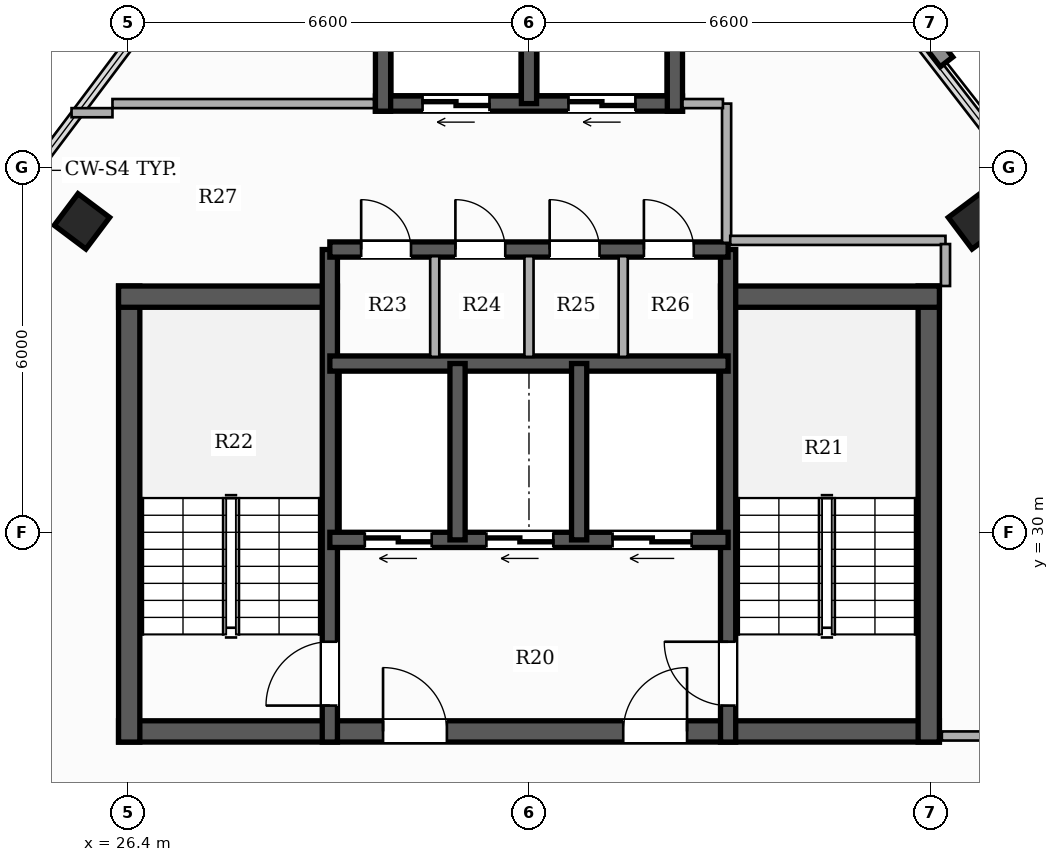
"""IFC4 building model, lengths in metres.
Left out: names, types, materials, properties, quantities, classifications, styles, units other than length and angle.
Written with IfcOpenShell. Run it as: python <this file> out.ifc"""

import sys

from ifc_helpers import new_model, si_unit, direction, frame, frame_2d, origin, origin_2d, place, context, subcontext, project, spatial, rectangle, hollow_rectangle, extrude, element, fill, save


model = new_model("IFC4")
c1 = context("Model", 3, precision=1e-05, world=origin(), true_north=direction((0.0, 1.0)))
c2 = subcontext(c1, "Body", "Model", "MODEL_VIEW")
j1 = project(units=[si_unit("LENGTHUNIT", "METRE"), si_unit("PLANEANGLEUNIT", "RADIAN")], contexts=[c1])
p1 = place(None, origin())
s1 = spatial("IfcSite", under=j1, at=p1, CompositionType="ELEMENT")
p2 = place(p1, origin())
s2 = spatial("IfcBuilding", under=s1, at=p2, CompositionType="ELEMENT")
p3 = place(p2, frame((0.0, 0.0, 270.05)))
s3 = spatial("IfcBuildingStorey", under=s2, at=p3, CompositionType="ELEMENT", Elevation=270.05)
p4 = place(p3, frame((26.25, 26.725, 0.0), z_axis=(0.0, 0.0, 1.0), x_axis=(1.0, 0.0, 0.0)))
e1 = element("IfcWall", 1, at=p4, inside=s3, PredefinedType="SHEAR", context=c2, shape_type="SweptSolid", body=[
    extrude(rectangle(XDim=13.5, YDim=0.35, at=frame_2d((6.75, 0.0))), origin(), (0.0, 0.0, 1.0), 3.3),
])
p5 = place(p4, frame((4.35, 0.0, 0.0)))
e2 = element("IfcOpeningElement", 2, at=p5, cuts=e1, PredefinedType="OPENING", context=c2, shape_type="SweptSolid", body=[
    extrude(rectangle(XDim=1.05, YDim=2.15, at=frame_2d((0.525, 1.075))), frame((0.0, 0.185, 0.0), z_axis=(0.0, -1.0, 0.0), x_axis=(1.0, 0.0, 0.0)), (0.0, 0.0, 1.0), 0.37),
])
p6 = place(p4, frame((8.3, 0.0, 0.0)))
e3 = element("IfcOpeningElement", 3, at=p6, cuts=e1, PredefinedType="OPENING", context=c2, shape_type="SweptSolid", body=[
    extrude(rectangle(XDim=1.05, YDim=2.15, at=frame_2d((0.525, 1.075))), frame((0.0, 0.185, 0.0), z_axis=(0.0, -1.0, 0.0), x_axis=(1.0, 0.0, 0.0)), (0.0, 0.0, 1.0), 0.37),
])
p7 = place(p3, frame((26.425, 26.55, 0.0), z_axis=(0.0, 0.0, 1.0), x_axis=(0.0, 1.0, 0.0)))
e4 = element("IfcWall", 4, at=p7, inside=s3, PredefinedType="SHEAR", context=c2, shape_type="SweptSolid", body=[
    extrude(rectangle(XDim=7.5, YDim=0.35, at=frame_2d((3.75, 0.0))), origin(), (0.0, 0.0, 1.0), 3.3),
])
p8 = place(p3, frame((26.25, 33.875, 0.0), z_axis=(0.0, 0.0, 1.0), x_axis=(1.0, 0.0, 0.0)))
e5 = element("IfcWall", 5, at=p8, inside=s3, PredefinedType="SHEAR", context=c2, shape_type="SweptSolid", body=[
    extrude(rectangle(XDim=3.6, YDim=0.35, at=frame_2d((1.8, 0.0))), origin(), (0.0, 0.0, 1.0), 3.3),
])
p9 = place(p3, frame((39.575, 26.55, 0.0), z_axis=(0.0, 0.0, 1.0), x_axis=(0.0, 1.0, 0.0)))
e6 = element("IfcWall", 6, at=p9, inside=s3, PredefinedType="SHEAR", context=c2, shape_type="SweptSolid", body=[
    extrude(rectangle(XDim=7.5, YDim=0.35, at=frame_2d((3.75, 0.0))), origin(), (0.0, 0.0, 1.0), 3.3),
])
p10 = place(p3, frame((36.15, 33.875, 0.0), z_axis=(0.0, 0.0, 1.0), x_axis=(1.0, 0.0, 0.0)))
e7 = element("IfcWall", 7, at=p10, inside=s3, PredefinedType="SHEAR", context=c2, shape_type="SweptSolid", body=[
    extrude(rectangle(XDim=3.6, YDim=0.35, at=frame_2d((1.8, 0.0))), origin(), (0.0, 0.0, 1.0), 3.3),
])
p11 = place(p3, frame((29.725, 26.55, 0.0), z_axis=(0.0, 0.0, 1.0), x_axis=(0.0, 1.0, 0.0)))
e8 = element("IfcWall", 8, at=p11, inside=s3, PredefinedType="SHEAR", context=c2, shape_type="SweptSolid", body=[
    extrude(rectangle(XDim=8.1, YDim=0.25, at=frame_2d((4.05, 0.0))), origin(), (0.0, 0.0, 1.0), 3.3),
])
p12 = place(p11, frame((0.6, 0.0, 0.0)))
e9 = element("IfcOpeningElement", 9, at=p12, cuts=e8, PredefinedType="OPENING", context=c2, shape_type="SweptSolid", body=[
    extrude(rectangle(XDim=1.05, YDim=2.15, at=frame_2d((0.525, 1.075))), frame((0.0, 0.135, 0.0), z_axis=(0.0, -1.0, 0.0), x_axis=(1.0, 0.0, 0.0)), (0.0, 0.0, 1.0), 0.27),
])
p13 = place(p3, frame((36.275, 26.55, 0.0), z_axis=(0.0, 0.0, 1.0), x_axis=(0.0, 1.0, 0.0)))
e10 = element("IfcWall", 10, at=p13, inside=s3, PredefinedType="SHEAR", context=c2, shape_type="SweptSolid", body=[
    extrude(rectangle(XDim=8.1, YDim=0.25, at=frame_2d((4.05, 0.0))), origin(), (0.0, 0.0, 1.0), 3.3),
])
p14 = place(p13, frame((0.6, 0.0, 0.0)))
e11 = element("IfcOpeningElement", 11, at=p14, cuts=e10, PredefinedType="OPENING", context=c2, shape_type="SweptSolid", body=[
    extrude(rectangle(XDim=1.05, YDim=2.15, at=frame_2d((0.525, 1.075))), frame((0.0, 0.135, 0.0), z_axis=(0.0, -1.0, 0.0), x_axis=(1.0, 0.0, 0.0)), (0.0, 0.0, 1.0), 0.27),
])
p15 = place(p3, frame((36.275, 29.875, 0.0), z_axis=(0.0, 0.0, 1.0), x_axis=(-1.0, 0.0, 0.0)))
e12 = element("IfcWall", 12, at=p15, inside=s3, PredefinedType="SHEAR", context=c2, shape_type="SweptSolid", body=[
    extrude(rectangle(XDim=6.55, YDim=0.25, at=frame_2d((3.275, 0.0))), origin(), (0.0, 0.0, 1.0), 3.3),
])
p16 = place(p15, frame((4.875, 0.0, 0.0)))
e13 = element("IfcOpeningElement", 13, at=p16, cuts=e12, PredefinedType="OPENING", context=c2, shape_type="SweptSolid", body=[
    extrude(rectangle(XDim=1.1, YDim=2.2, at=frame_2d((0.55, 1.1))), frame((0.0, 0.135, 0.0), z_axis=(0.0, -1.0, 0.0), x_axis=(1.0, 0.0, 0.0)), (0.0, 0.0, 1.0), 0.27),
])
p17 = place(p15, frame((2.875, 0.0, 0.0)))
e14 = element("IfcOpeningElement", 14, at=p17, cuts=e12, PredefinedType="OPENING", context=c2, shape_type="SweptSolid", body=[
    extrude(rectangle(XDim=1.1, YDim=2.2, at=frame_2d((0.55, 1.1))), frame((0.0, 0.135, 0.0), z_axis=(0.0, -1.0, 0.0), x_axis=(1.0, 0.0, 0.0)), (0.0, 0.0, 1.0), 0.27),
])
p18 = place(p15, frame((0.6, 0.0, 0.0)))
e15 = element("IfcOpeningElement", 15, at=p18, cuts=e12, PredefinedType="OPENING", context=c2, shape_type="SweptSolid", body=[
    extrude(rectangle(XDim=1.3, YDim=2.2, at=frame_2d((0.65, 1.1))), frame((0.0, 0.135, 0.0), z_axis=(0.0, -1.0, 0.0), x_axis=(1.0, 0.0, 0.0)), (0.0, 0.0, 1.0), 0.27),
])
p19 = place(p3, frame((29.725, 32.775, 0.0), z_axis=(0.0, 0.0, 1.0), x_axis=(1.0, 0.0, 0.0)))
e16 = element("IfcWall", 16, at=p19, inside=s3, PredefinedType="SHEAR", context=c2, shape_type="SweptSolid", body=[
    extrude(rectangle(XDim=6.55, YDim=0.25, at=frame_2d((3.275, 0.0))), origin(), (0.0, 0.0, 1.0), 3.3),
])
for number, where, z_axis, x_axis in (
    (17, (31.825, 29.875, 0.0), (0.0, 0.0, 1.0), (0.0, 1.0, 0.0)),
    (18, (33.825, 29.875, 0.0), (0.0, 0.0, 1.0), (0.0, 1.0, 0.0)),
):
    element("IfcWall", number, at=place(p3, frame(where, z_axis=z_axis, x_axis=x_axis)), inside=s3, PredefinedType="SHEAR", context=c2, shape_type="SweptSolid", body=[
        extrude(rectangle(XDim=2.9, YDim=0.25, at=frame_2d((1.45, 0.0))), origin(), (0.0, 0.0, 1.0), 3.3),
    ])
p20 = place(p3, frame((29.725, 34.65, 0.0), z_axis=(0.0, 0.0, 1.0), x_axis=(1.0, 0.0, 0.0)))
e19 = element("IfcWall", 19, at=p20, inside=s3, PredefinedType="SHEAR", context=c2, shape_type="SweptSolid", body=[
    extrude(rectangle(XDim=6.55, YDim=0.25, at=frame_2d((3.275, 0.0))), origin(), (0.0, 0.0, 1.0), 3.3),
])
p21 = place(p20, frame((0.515, 0.0, 0.0)))
e20 = element("IfcOpeningElement", 20, at=p21, cuts=e19, PredefinedType="OPENING", context=c2, shape_type="SweptSolid", body=[
    extrude(rectangle(XDim=0.82, YDim=2.1, at=frame_2d((0.41, 1.05))), frame((0.0, 0.135, 0.0), z_axis=(0.0, -1.0, 0.0), x_axis=(1.0, 0.0, 0.0)), (0.0, 0.0, 1.0), 0.27),
])
p22 = place(p20, frame((2.065, 0.0, 0.0)))
e21 = element("IfcOpeningElement", 21, at=p22, cuts=e19, PredefinedType="OPENING", context=c2, shape_type="SweptSolid", body=[
    extrude(rectangle(XDim=0.82, YDim=2.1, at=frame_2d((0.41, 1.05))), frame((0.0, 0.135, 0.0), z_axis=(0.0, -1.0, 0.0), x_axis=(1.0, 0.0, 0.0)), (0.0, 0.0, 1.0), 0.27),
])
p23 = place(p20, frame((3.615, 0.0, 0.0)))
e22 = element("IfcOpeningElement", 22, at=p23, cuts=e19, PredefinedType="OPENING", context=c2, shape_type="SweptSolid", body=[
    extrude(rectangle(XDim=0.82, YDim=2.1, at=frame_2d((0.41, 1.05))), frame((0.0, 0.135, 0.0), z_axis=(0.0, -1.0, 0.0), x_axis=(1.0, 0.0, 0.0)), (0.0, 0.0, 1.0), 0.27),
])
p24 = place(p20, frame((5.165, 0.0, 0.0)))
e23 = element("IfcOpeningElement", 23, at=p24, cuts=e19, PredefinedType="OPENING", context=c2, shape_type="SweptSolid", body=[
    extrude(rectangle(XDim=0.82, YDim=2.1, at=frame_2d((0.41, 1.05))), frame((0.0, 0.135, 0.0), z_axis=(0.0, -1.0, 0.0), x_axis=(1.0, 0.0, 0.0)), (0.0, 0.0, 1.0), 0.27),
])
p25 = place(p3, frame((35.525, 37.05, 0.0), z_axis=(0.0, 0.0, 1.0), x_axis=(-1.0, 0.0, 0.0)))
e24 = element("IfcWall", 24, at=p25, inside=s3, PredefinedType="SHEAR", context=c2, shape_type="SweptSolid", body=[
    extrude(rectangle(XDim=5.05, YDim=0.25, at=frame_2d((2.525, 0.0))), origin(), (0.0, 0.0, 1.0), 3.3),
])
p26 = place(p25, frame((3.175, 0.0, 0.0)))
e25 = element("IfcOpeningElement", 25, at=p26, cuts=e24, PredefinedType="OPENING", context=c2, shape_type="SweptSolid", body=[
    extrude(rectangle(XDim=1.1, YDim=2.2, at=frame_2d((0.55, 1.1))), frame((0.0, 0.135, 0.0), z_axis=(0.0, -1.0, 0.0), x_axis=(1.0, 0.0, 0.0)), (0.0, 0.0, 1.0), 0.27),
])
p27 = place(p25, frame((0.775, 0.0, 0.0)))
e26 = element("IfcOpeningElement", 26, at=p27, cuts=e24, PredefinedType="OPENING", context=c2, shape_type="SweptSolid", body=[
    extrude(rectangle(XDim=1.1, YDim=2.2, at=frame_2d((0.55, 1.1))), frame((0.0, 0.135, 0.0), z_axis=(0.0, -1.0, 0.0), x_axis=(1.0, 0.0, 0.0)), (0.0, 0.0, 1.0), 0.27),
])
for number, where, z_axis, x_axis in (
    (27, (30.6, 36.925, 0.0), (0.0, 0.0, 1.0), (0.0, 1.0, 0.0)),
    (28, (35.4, 36.925, 0.0), (0.0, 0.0, 1.0), (0.0, 1.0, 0.0)),
):
    element("IfcWall", number, at=place(p3, frame(where, z_axis=z_axis, x_axis=x_axis)), inside=s3, PredefinedType="SHEAR", context=c2, shape_type="SweptSolid", body=[
        extrude(rectangle(XDim=2.8, YDim=0.25, at=frame_2d((1.4, 0.0))), origin(), (0.0, 0.0, 1.0), 3.3),
    ])
p28 = place(p3, frame((33.0, 37.05, 0.0), z_axis=(0.0, 0.0, 1.0), x_axis=(0.0, 1.0, 0.0)))
e29 = element("IfcWall", 29, at=p28, inside=s3, PredefinedType="SHEAR", context=c2, shape_type="SweptSolid", body=[
    extrude(rectangle(XDim=2.55, YDim=0.25, at=frame_2d((1.275, 0.0))), origin(), (0.0, 0.0, 1.0), 3.3),
])
for number, where, z_axis, x_axis in (
    (30, (25.648, 35.113, 0.0), (0.0, 0.0, 1.0), (0.6, 0.8, 0.0)),
    (31, (40.352, 35.113, 0.0), (0.0, 0.0, 1.0), (-0.6, 0.8, 0.0)),
):
    element("IfcColumn", number, at=place(p3, frame(where, z_axis=z_axis, x_axis=x_axis)), inside=s3, PredefinedType="COLUMN", context=c2, shape_type="SweptSolid", body=[
        extrude(hollow_rectangle(XDim=0.65, YDim=0.65, WallThickness=0.022, at=origin_2d()), origin(), (0.0, 0.0, 1.0), 3.3),
    ])
p29 = place(p3, frame((36.25, 34.76, 0.0), z_axis=(0.0, 0.0, 1.0), x_axis=(0.0, 1.0, 0.0)))
e32 = element("IfcWall", 32, at=p29, inside=s3, PredefinedType="PARTITIONING", context=c2, shape_type="SweptSolid", body=[
    extrude(rectangle(XDim=2.29, YDim=0.15, at=frame_2d((1.145, 0.0))), origin(), (0.0, 0.0, 1.0), 2.425),
])
p30 = place(p3, frame((35.525, 37.05, 0.0), z_axis=(0.0, 0.0, 1.0), x_axis=(1.0, 0.0, 0.0)))
e33 = element("IfcWall", 33, at=p30, inside=s3, PredefinedType="PARTITIONING", context=c2, shape_type="SweptSolid", body=[
    extrude(rectangle(XDim=0.665, YDim=0.15, at=frame_2d((0.333, 0.0))), origin(), (0.0, 0.0, 1.0), 2.425),
])
for number, where, z_axis, x_axis in (
    (34, (31.45, 32.885, 0.0), (0.0, 0.0, 1.0), (0.0, 1.0, 0.0)),
    (35, (33.0, 32.885, 0.0), (0.0, 0.0, 1.0), (0.0, 1.0, 0.0)),
    (36, (34.55, 32.885, 0.0), (0.0, 0.0, 1.0), (0.0, 1.0, 0.0)),
):
    element("IfcWall", number, at=place(p3, frame(where, z_axis=z_axis, x_axis=x_axis)), inside=s3, PredefinedType="PARTITIONING", context=c2, shape_type="SweptSolid", body=[
        extrude(rectangle(XDim=1.655, YDim=0.15, at=frame_2d((0.828, 0.0))), origin(), (0.0, 0.0, 1.0), 3.06),
    ])
p31 = place(p3, frame((25.477, 36.9, 0.0), z_axis=(0.0, 0.0, 1.0), x_axis=(1.0, 0.0, 0.0)))
e37 = element("IfcWall", 37, at=p31, inside=s3, PredefinedType="PARTITIONING", context=c2, shape_type="SweptSolid", body=[
    extrude(rectangle(XDim=0.673, YDim=0.15, at=frame_2d((0.336, 0.0))), origin(), (0.0, 0.0, 1.0), 3.06),
])
p32 = place(p3, frame((39.79, 26.65, 0.0), z_axis=(0.0, 0.0, 1.0), x_axis=(1.0, 0.0, 0.0)))
e38 = element("IfcWall", 38, at=p32, inside=s3, PredefinedType="PARTITIONING", context=c2, shape_type="SweptSolid", body=[
    extrude(rectangle(XDim=2.46, YDim=0.15, at=frame_2d((1.23, 0.0))), origin(), (0.0, 0.0, 1.0), 2.565),
])
p33 = place(p3, frame((26.15, 37.05, 0.0), z_axis=(0.0, 0.0, 1.0), x_axis=(1.0, 0.0, 0.0)))
e39 = element("IfcWall", 39, at=p33, inside=s3, PredefinedType="PARTITIONING", context=c2, shape_type="SweptSolid", body=[
    extrude(rectangle(XDim=4.3, YDim=0.15, at=frame_2d((2.15, 0.0))), origin(), (0.0, 0.0, 1.0), 2.425),
])
p34 = place(p3, frame((36.31, 34.8, 0.0), z_axis=(0.0, 0.0, 1.0), x_axis=(1.0, 0.0, 0.0)))
e40 = element("IfcWall", 40, at=p34, inside=s3, PredefinedType="PARTITIONING", context=c2, shape_type="SweptSolid", body=[
    extrude(rectangle(XDim=3.54, YDim=0.15, at=frame_2d((1.77, 0.0))), origin(), (0.0, 0.0, 1.0), 2.425),
])
p35 = place(p3, frame((39.85, 34.74, 0.0), z_axis=(0.0, 0.0, 1.0), x_axis=(0.0, -1.0, 0.0)))
e41 = element("IfcWall", 41, at=p35, inside=s3, PredefinedType="PARTITIONING", context=c2, shape_type="SweptSolid", body=[
    extrude(rectangle(XDim=0.69, YDim=0.15, at=frame_2d((0.345, 0.0))), origin(), (0.0, 0.0, 1.0), 2.773),
])
p36 = place(p12, origin())
e42 = element("IfcDoor", 42, at=p36, inside=s3, OperationType="SINGLE_SWING_LEFT", PredefinedType="DOOR", context=c2, shape_type="SweptSolid", body=[
    extrude(rectangle(XDim=1.05, YDim=2.15, at=frame_2d((0.525, 1.075))), frame((0.0, 0.025, 0.0), z_axis=(0.0, -1.0, 0.0), x_axis=(1.0, 0.0, 0.0)), (0.0, 0.0, 1.0), 0.05),
])
fill(e9, e42)
p37 = place(p14, origin())
e43 = element("IfcDoor", 43, at=p37, inside=s3, OperationType="SINGLE_SWING_RIGHT", PredefinedType="DOOR", context=c2, shape_type="SweptSolid", body=[
    extrude(rectangle(XDim=1.05, YDim=2.15, at=frame_2d((0.525, 1.075))), frame((0.0, 0.025, 0.0), z_axis=(0.0, -1.0, 0.0), x_axis=(1.0, 0.0, 0.0)), (0.0, 0.0, 1.0), 0.05),
])
fill(e11, e43)
p38 = place(p5, origin())
e44 = element("IfcDoor", 44, at=p38, inside=s3, OperationType="SINGLE_SWING_LEFT", PredefinedType="DOOR", context=c2, shape_type="SweptSolid", body=[
    extrude(rectangle(XDim=1.05, YDim=2.15, at=frame_2d((0.525, 1.075))), frame((0.0, 0.025, 0.0), z_axis=(0.0, -1.0, 0.0), x_axis=(1.0, 0.0, 0.0)), (0.0, 0.0, 1.0), 0.05),
])
fill(e2, e44)
p39 = place(p6, origin())
e45 = element("IfcDoor", 45, at=p39, inside=s3, OperationType="SINGLE_SWING_RIGHT", PredefinedType="DOOR", context=c2, shape_type="SweptSolid", body=[
    extrude(rectangle(XDim=1.05, YDim=2.15, at=frame_2d((0.525, 1.075))), frame((0.0, 0.025, 0.0), z_axis=(0.0, -1.0, 0.0), x_axis=(1.0, 0.0, 0.0)), (0.0, 0.0, 1.0), 0.05),
])
fill(e3, e45)
p40 = place(p16, origin())
e46 = element("IfcDoor", 46, at=p40, inside=s3, OperationType="DOUBLE_DOOR_SLIDING", PredefinedType="DOOR", context=c2, shape_type="SweptSolid", body=[
    extrude(rectangle(XDim=1.1, YDim=2.2, at=frame_2d((0.55, 1.1))), frame((0.0, 0.025, 0.0), z_axis=(0.0, -1.0, 0.0), x_axis=(1.0, 0.0, 0.0)), (0.0, 0.0, 1.0), 0.05),
])
fill(e13, e46)
p41 = place(p17, origin())
e47 = element("IfcDoor", 47, at=p41, inside=s3, OperationType="DOUBLE_DOOR_SLIDING", PredefinedType="DOOR", context=c2, shape_type="SweptSolid", body=[
    extrude(rectangle(XDim=1.1, YDim=2.2, at=frame_2d((0.55, 1.1))), frame((0.0, 0.025, 0.0), z_axis=(0.0, -1.0, 0.0), x_axis=(1.0, 0.0, 0.0)), (0.0, 0.0, 1.0), 0.05),
])
fill(e14, e47)
p42 = place(p18, origin())
e48 = element("IfcDoor", 48, at=p42, inside=s3, OperationType="DOUBLE_DOOR_SLIDING", PredefinedType="DOOR", context=c2, shape_type="SweptSolid", body=[
    extrude(rectangle(XDim=1.3, YDim=2.2, at=frame_2d((0.65, 1.1))), frame((0.0, 0.025, 0.0), z_axis=(0.0, -1.0, 0.0), x_axis=(1.0, 0.0, 0.0)), (0.0, 0.0, 1.0), 0.05),
])
fill(e15, e48)
p43 = place(p26, origin())
e49 = element("IfcDoor", 49, at=p43, inside=s3, OperationType="DOUBLE_DOOR_SLIDING", PredefinedType="DOOR", context=c2, shape_type="SweptSolid", body=[
    extrude(rectangle(XDim=1.1, YDim=2.2, at=frame_2d((0.55, 1.1))), frame((0.0, 0.025, 0.0), z_axis=(0.0, -1.0, 0.0), x_axis=(1.0, 0.0, 0.0)), (0.0, 0.0, 1.0), 0.05),
])
fill(e25, e49)
p44 = place(p27, origin())
e50 = element("IfcDoor", 50, at=p44, inside=s3, OperationType="DOUBLE_DOOR_SLIDING", PredefinedType="DOOR", context=c2, shape_type="SweptSolid", body=[
    extrude(rectangle(XDim=1.1, YDim=2.2, at=frame_2d((0.55, 1.1))), frame((0.0, 0.025, 0.0), z_axis=(0.0, -1.0, 0.0), x_axis=(1.0, 0.0, 0.0)), (0.0, 0.0, 1.0), 0.05),
])
fill(e26, e50)
p45 = place(p21, origin())
e51 = element("IfcDoor", 51, at=p45, inside=s3, OperationType="SINGLE_SWING_LEFT", PredefinedType="DOOR", context=c2, shape_type="SweptSolid", body=[
    extrude(rectangle(XDim=0.82, YDim=2.1, at=frame_2d((0.41, 1.05))), frame((0.0, 0.025, 0.0), z_axis=(0.0, -1.0, 0.0), x_axis=(1.0, 0.0, 0.0)), (0.0, 0.0, 1.0), 0.05),
])
fill(e20, e51)
p46 = place(p22, origin())
e52 = element("IfcDoor", 52, at=p46, inside=s3, OperationType="SINGLE_SWING_LEFT", PredefinedType="DOOR", context=c2, shape_type="SweptSolid", body=[
    extrude(rectangle(XDim=0.82, YDim=2.1, at=frame_2d((0.41, 1.05))), frame((0.0, 0.025, 0.0), z_axis=(0.0, -1.0, 0.0), x_axis=(1.0, 0.0, 0.0)), (0.0, 0.0, 1.0), 0.05),
])
fill(e21, e52)
p47 = place(p23, origin())
e53 = element("IfcDoor", 53, at=p47, inside=s3, OperationType="SINGLE_SWING_LEFT", PredefinedType="DOOR", context=c2, shape_type="SweptSolid", body=[
    extrude(rectangle(XDim=0.82, YDim=2.1, at=frame_2d((0.41, 1.05))), frame((0.0, 0.025, 0.0), z_axis=(0.0, -1.0, 0.0), x_axis=(1.0, 0.0, 0.0)), (0.0, 0.0, 1.0), 0.05),
])
fill(e22, e53)
p48 = place(p24, origin())
e54 = element("IfcDoor", 54, at=p48, inside=s3, OperationType="SINGLE_SWING_LEFT", PredefinedType="DOOR", context=c2, shape_type="SweptSolid", body=[
    extrude(rectangle(XDim=0.82, YDim=2.1, at=frame_2d((0.41, 1.05))), frame((0.0, 0.025, 0.0), z_axis=(0.0, -1.0, 0.0), x_axis=(1.0, 0.0, 0.0)), (0.0, 0.0, 1.0), 0.05),
])
fill(e23, e54)
save(model, sys.argv[1])
